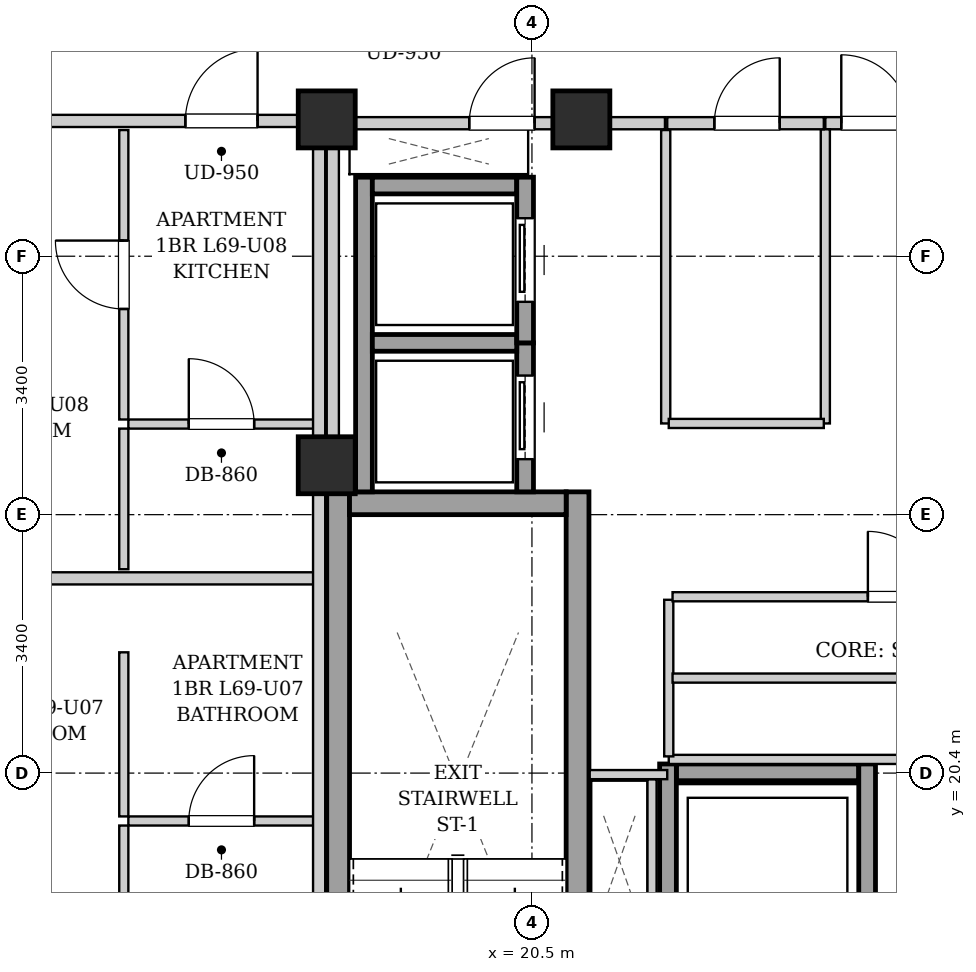
"""IFC4 building model, lengths in metres.
Left out: names, types, materials, properties, quantities, classifications, styles, units other than length and angle.
Written with IfcOpenShell. Run it as: python <this file> out.ifc"""

import sys

from ifc_helpers import new_model, si_unit, direction, frame, frame_2d, origin, origin_2d, place, context, subcontext, project, spatial, rectangle, extrude, element, fill, save


model = new_model("IFC4")
c1 = context("Model", 3, precision=1e-05, world=origin(), true_north=direction((0.0, 1.0)))
c2 = subcontext(c1, "Body", "Model", "MODEL_VIEW")
j1 = project(units=[si_unit("LENGTHUNIT", "METRE"), si_unit("PLANEANGLEUNIT", "RADIAN")], contexts=[c1])
p1 = place(None, origin())
s1 = spatial("IfcSite", under=j1, at=p1, CompositionType="ELEMENT")
p2 = place(p1, origin())
s2 = spatial("IfcBuilding", under=s1, at=p2, CompositionType="ELEMENT")
p3 = place(p2, frame((0.0, 0.0, 237.7)))
s3 = spatial("IfcBuildingStorey", under=s2, at=p3, CompositionType="ELEMENT", Elevation=237.7)
for number, where, z_axis, x_axis in (
    (1, (17.8, 29.0, 0.0), (0.0, 0.0, 1.0), (1.0, 0.0, 0.0)),
    (2, (21.15, 29.0, 0.0), (0.0, 0.0, 1.0), (1.0, 0.0, 0.0)),
    (3, (17.8, 24.45, 0.0), (0.0, 0.0, 1.0), (1.0, 0.0, 0.0)),
):
    element("IfcColumn", number, at=place(p3, frame(where, z_axis=z_axis, x_axis=x_axis)), inside=s3, PredefinedType="COLUMN", context=c2, shape_type="SweptSolid", body=[
        extrude(rectangle(XDim=0.75, YDim=0.75, at=origin_2d()), origin(), (0.0, 0.0, 1.0), 3.4),
    ])
for number, where, z_axis, x_axis in (
    (4, (17.95, 15.1, 0.0), (0.0, 0.0, 1.0), (0.0, 1.0, 0.0)),
    (5, (21.1, 15.1, 0.0), (0.0, 0.0, 1.0), (0.0, 1.0, 0.0)),
):
    element("IfcWall", number, at=place(p3, frame(where, z_axis=z_axis, x_axis=x_axis)), inside=s3, PredefinedType="SHEAR", context=c2, shape_type="SweptSolid", body=[
        extrude(rectangle(XDim=9.0, YDim=0.3, at=frame_2d((4.5, 0.0))), origin(), (0.0, 0.0, 1.0), 3.14),
    ])
p4 = place(p3, frame((18.1, 23.95, 0.0), z_axis=(0.0, 0.0, 1.0), x_axis=(1.0, 0.0, 0.0)))
e6 = element("IfcWall", 6, at=p4, inside=s3, PredefinedType="SHEAR", context=c2, shape_type="SweptSolid", body=[
    extrude(rectangle(XDim=2.85, YDim=0.3, at=frame_2d((1.425, 0.0))), origin(), (0.0, 0.0, 1.0), 3.14),
])
p5 = place(p3, frame((18.29, 24.1, 0.0), z_axis=(0.0, 0.0, 1.0), x_axis=(0.0, 1.0, 0.0)))
e7 = element("IfcWall", 7, at=p5, inside=s3, PredefinedType="SHEAR", context=c2, shape_type="SweptSolid", body=[
    extrude(rectangle(XDim=4.14, YDim=0.22, at=frame_2d((2.07, 0.0))), origin(), (0.0, 0.0, 1.0), 3.14),
])
p6 = place(p3, frame((20.41, 24.1, 0.0), z_axis=(0.0, 0.0, 1.0), x_axis=(0.0, 1.0, 0.0)))
e8 = element("IfcWall", 8, at=p6, inside=s3, PredefinedType="SHEAR", context=c2, shape_type="SweptSolid", body=[
    extrude(rectangle(XDim=1.96, YDim=0.22, at=frame_2d((0.98, 0.0))), origin(), (0.0, 0.0, 1.0), 3.14),
])
p7 = place(p6, frame((0.43, 0.0, 0.0)))
e9 = element("IfcOpeningElement", 9, at=p7, cuts=e8, PredefinedType="OPENING", context=c2, shape_type="SweptSolid", body=[
    extrude(rectangle(XDim=1.1, YDim=2.15, at=frame_2d((0.55, 1.075))), frame((0.0, 0.12, 0.0), z_axis=(0.0, -1.0, 0.0), x_axis=(1.0, 0.0, 0.0)), (0.0, 0.0, 1.0), 0.24),
])
for number, where, z_axis, x_axis in (
    (10, (18.4, 26.06, 0.0), (0.0, 0.0, 1.0), (1.0, 0.0, 0.0)),
    (11, (18.4, 28.13, 0.0), (0.0, 0.0, 1.0), (1.0, 0.0, 0.0)),
):
    element("IfcWall", number, at=place(p3, frame(where, z_axis=z_axis, x_axis=x_axis)), inside=s3, PredefinedType="SHEAR", context=c2, shape_type="SweptSolid", body=[
        extrude(rectangle(XDim=1.9, YDim=0.22, at=frame_2d((0.95, 0.0))), origin(), (0.0, 0.0, 1.0), 3.14),
    ])
p8 = place(p3, frame((20.41, 26.06, 0.0), z_axis=(0.0, 0.0, 1.0), x_axis=(0.0, 1.0, 0.0)))
e12 = element("IfcWall", 12, at=p8, inside=s3, PredefinedType="SHEAR", context=c2, shape_type="SweptSolid", body=[
    extrude(rectangle(XDim=2.18, YDim=0.22, at=frame_2d((1.09, 0.0))), origin(), (0.0, 0.0, 1.0), 3.14),
])
p9 = place(p8, frame((0.54, 0.0, 0.0)))
e13 = element("IfcOpeningElement", 13, at=p9, cuts=e12, PredefinedType="OPENING", context=c2, shape_type="SweptSolid", body=[
    extrude(rectangle(XDim=1.1, YDim=2.15, at=frame_2d((0.55, 1.075))), frame((0.0, 0.12, 0.0), z_axis=(0.0, -1.0, 0.0), x_axis=(1.0, 0.0, 0.0)), (0.0, 0.0, 1.0), 0.24),
])
p10 = place(p3, frame((22.4, 20.41, 0.0), z_axis=(0.0, 0.0, 1.0), x_axis=(1.0, 0.0, 0.0)))
e14 = element("IfcWall", 14, at=p10, inside=s3, PredefinedType="SHEAR", context=c2, shape_type="SweptSolid", body=[
    extrude(rectangle(XDim=2.4, YDim=0.22, at=frame_2d((1.2, 0.0))), origin(), (0.0, 0.0, 1.0), 3.14),
])
for number, where, z_axis, x_axis in (
    (15, (22.29, 17.98, 0.0), (0.0, 0.0, 1.0), (0.0, 1.0, 0.0)),
    (16, (24.91, 17.98, 0.0), (0.0, 0.0, 1.0), (0.0, 1.0, 0.0)),
):
    element("IfcWall", number, at=place(p3, frame(where, z_axis=z_axis, x_axis=x_axis)), inside=s3, PredefinedType="SHEAR", context=c2, shape_type="SweptSolid", body=[
        extrude(rectangle(XDim=2.54, YDim=0.22, at=frame_2d((1.27, 0.0))), origin(), (0.0, 0.0, 1.0), 3.14),
    ])
p11 = place(p3, frame((17.88, 24.12, 0.0), z_axis=(0.0, 0.0, 1.0), x_axis=(0.0, 1.0, 0.0)))
e17 = element("IfcWall", 17, at=p11, inside=s3, PredefinedType="PARTITIONING", context=c2, shape_type="SweptSolid", body=[
    extrude(rectangle(XDim=4.76, YDim=0.16, at=frame_2d((2.38, 0.0))), origin(), (0.0, 0.0, 1.0), 2.475),
])
p12 = place(p3, frame((24.36, 28.95, 0.0), z_axis=(0.0, 0.0, 1.0), x_axis=(1.0, 0.0, 0.0)))
e18 = element("IfcWall", 18, at=p12, inside=s3, PredefinedType="PARTITIONING", context=c2, shape_type="SweptSolid", body=[
    extrude(rectangle(XDim=1.32, YDim=0.16, at=frame_2d((0.66, 0.0))), origin(), (0.0, 0.0, 1.0), 2.668),
])
p13 = place(p12, frame((0.21, 0.0, 0.0)))
e19 = element("IfcOpeningElement", 19, at=p13, cuts=e18, PredefinedType="OPENING", context=c2, shape_type="SweptSolid", body=[
    extrude(rectangle(XDim=0.9, YDim=2.05, at=frame_2d((0.45, 1.025))), frame((0.0, 0.09, 0.0), z_axis=(0.0, -1.0, 0.0), x_axis=(1.0, 0.0, 0.0)), (0.0, 0.0, 1.0), 0.18),
])
p14 = place(p3, frame((17.96, 28.95, 0.0), z_axis=(0.0, 0.0, 1.0), x_axis=(1.0, 0.0, 0.0)))
e20 = element("IfcWall", 20, at=p14, inside=s3, PredefinedType="PARTITIONING", context=c2, shape_type="SweptSolid", body=[
    extrude(rectangle(XDim=4.29, YDim=0.16, at=frame_2d((2.145, 0.0))), origin(), (0.0, 0.0, 1.0), 2.668),
])
p15 = place(p14, frame((1.715, 0.0, 0.0)))
e21 = element("IfcOpeningElement", 21, at=p15, cuts=e20, PredefinedType="OPENING", context=c2, shape_type="SweptSolid", body=[
    extrude(rectangle(XDim=0.86, YDim=2.05, at=frame_2d((0.43, 1.025))), frame((0.0, 0.09, 0.0), z_axis=(0.0, -1.0, 0.0), x_axis=(1.0, 0.0, 0.0)), (0.0, 0.0, 1.0), 0.18),
])
p16 = place(p3, frame((22.08, 18.2, 0.0), z_axis=(0.0, 0.0, 1.0), x_axis=(0.0, 1.0, 0.0)))
e22 = element("IfcWall", 22, at=p16, inside=s3, PredefinedType="PARTITIONING", context=c2, shape_type="SweptSolid", body=[
    extrude(rectangle(XDim=2.12, YDim=0.12, at=frame_2d((1.06, 0.0))), origin(), (0.0, 0.0, 1.0), 3.14),
])
p17 = place(p3, frame((22.28, 20.38, 0.0), z_axis=(0.0, 0.0, 1.0), x_axis=(-1.0, 0.0, 0.0)))
e23 = element("IfcWall", 23, at=p17, inside=s3, PredefinedType="PARTITIONING", context=c2, shape_type="SweptSolid", body=[
    extrude(rectangle(XDim=1.02, YDim=0.12, at=frame_2d((0.51, 0.0))), origin(), (0.0, 0.0, 1.0), 3.14),
])
p18 = place(p3, frame((24.36, 25.0, 0.0), z_axis=(0.0, 0.0, 1.0), x_axis=(0.0, 1.0, 0.0)))
e24 = element("IfcWall", 24, at=p18, inside=s3, PredefinedType="PARTITIONING", context=c2, shape_type="SweptSolid", body=[
    extrude(rectangle(XDim=3.87, YDim=0.12, at=frame_2d((1.935, 0.0))), origin(), (0.0, 0.0, 1.0), 3.14),
])
p19 = place(p3, frame((22.26, 25.0, 0.0), z_axis=(0.0, 0.0, 1.0), x_axis=(0.0, 1.0, 0.0)))
e25 = element("IfcWall", 25, at=p19, inside=s3, PredefinedType="PARTITIONING", context=c2, shape_type="SweptSolid", body=[
    extrude(rectangle(XDim=3.86, YDim=0.12, at=frame_2d((1.93, 0.0))), origin(), (0.0, 0.0, 1.0), 3.14),
])
p20 = place(p3, frame((22.3, 25.0, 0.0), z_axis=(0.0, 0.0, 1.0), x_axis=(1.0, 0.0, 0.0)))
e26 = element("IfcWall", 26, at=p20, inside=s3, PredefinedType="PARTITIONING", context=c2, shape_type="SweptSolid", body=[
    extrude(rectangle(XDim=2.04, YDim=0.12, at=frame_2d((1.02, 0.0))), origin(), (0.0, 0.0, 1.0), 3.14),
])
p21 = place(p3, frame((22.28, 28.95, 0.0), z_axis=(0.0, 0.0, 1.0), x_axis=(1.0, 0.0, 0.0)))
e27 = element("IfcWall", 27, at=p21, inside=s3, PredefinedType="PARTITIONING", context=c2, shape_type="SweptSolid", body=[
    extrude(rectangle(XDim=2.06, YDim=0.16, at=frame_2d((1.03, 0.0))), origin(), (0.0, 0.0, 1.0), 2.668),
])
p22 = place(p21, frame((0.62, 0.0, 0.0)))
e28 = element("IfcOpeningElement", 28, at=p22, cuts=e27, PredefinedType="OPENING", context=c2, shape_type="SweptSolid", body=[
    extrude(rectangle(XDim=0.86, YDim=2.05, at=frame_2d((0.43, 1.025))), frame((0.0, 0.09, 0.0), z_axis=(0.0, -1.0, 0.0), x_axis=(1.0, 0.0, 0.0)), (0.0, 0.0, 1.0), 0.18),
])
p23 = place(p3, frame((22.3, 20.58, 0.0), z_axis=(0.0, 0.0, 1.0), x_axis=(1.0, 0.0, 0.0)))
e29 = element("IfcWall", 29, at=p23, inside=s3, PredefinedType="PARTITIONING", context=c2, shape_type="SweptSolid", body=[
    extrude(rectangle(XDim=7.35, YDim=0.12, at=frame_2d((3.675, 0.0))), origin(), (0.0, 0.0, 1.0), 3.14),
])
p24 = place(p3, frame((22.3, 20.62, 0.0), z_axis=(0.0, 0.0, 1.0), x_axis=(0.0, 1.0, 0.0)))
e30 = element("IfcWall", 30, at=p24, inside=s3, PredefinedType="PARTITIONING", context=c2, shape_type="SweptSolid", body=[
    extrude(rectangle(XDim=2.06, YDim=0.12, at=frame_2d((1.03, 0.0))), origin(), (0.0, 0.0, 1.0), 3.14),
])
p25 = place(p3, frame((22.35, 21.65, 0.0), z_axis=(0.0, 0.0, 1.0), x_axis=(1.0, 0.0, 0.0)))
e31 = element("IfcWall", 31, at=p25, inside=s3, PredefinedType="PARTITIONING", context=c2, shape_type="SweptSolid", body=[
    extrude(rectangle(XDim=5.79, YDim=0.12, at=frame_2d((2.895, 0.0))), origin(), (0.0, 0.0, 1.0), 3.14),
])
p26 = place(p3, frame((22.35, 22.72, 0.0), z_axis=(0.0, 0.0, 1.0), x_axis=(1.0, 0.0, 0.0)))
e32 = element("IfcWall", 32, at=p26, inside=s3, PredefinedType="PARTITIONING", context=c2, shape_type="SweptSolid", body=[
    extrude(rectangle(XDim=7.27, YDim=0.12, at=frame_2d((3.635, 0.0))), origin(), (0.0, 0.0, 1.0), 3.14),
])
p27 = place(p26, frame((2.57, 0.0, 0.0)))
e33 = element("IfcOpeningElement", 33, at=p27, cuts=e32, PredefinedType="OPENING", context=c2, shape_type="SweptSolid", body=[
    extrude(rectangle(XDim=0.86, YDim=2.05, at=frame_2d((0.43, 1.025))), frame((0.0, 0.07, 0.0), z_axis=(0.0, -1.0, 0.0), x_axis=(1.0, 0.0, 0.0)), (0.0, 0.0, 1.0), 0.14),
])
p28 = place(p26, frame((6.06, 0.0, 0.0)))
e34 = element("IfcOpeningElement", 34, at=p28, cuts=e32, PredefinedType="OPENING", context=c2, shape_type="SweptSolid", body=[
    extrude(rectangle(XDim=0.86, YDim=2.05, at=frame_2d((0.43, 1.025))), frame((0.0, 0.07, 0.0), z_axis=(0.0, -1.0, 0.0), x_axis=(1.0, 0.0, 0.0)), (0.0, 0.0, 1.0), 0.14),
])
p29 = place(p3, frame((10.88, 22.962, 0.0), z_axis=(0.0, 0.0, 1.0), x_axis=(1.0, 0.0, 0.0)))
e35 = element("IfcWall", 35, at=p29, inside=s3, PredefinedType="PARTITIONING", context=c2, shape_type="SweptSolid", body=[
    extrude(rectangle(XDim=6.76, YDim=0.16, at=frame_2d((3.38, 0.0))), origin(), (0.0, 0.0, 1.0), 3.14),
])
p30 = place(p3, frame((15.19, 19.77, 0.0), z_axis=(0.0, 0.0, 1.0), x_axis=(1.0, 0.0, 0.0)))
e36 = element("IfcWall", 36, at=p30, inside=s3, PredefinedType="PARTITIONING", context=c2, shape_type="SweptSolid", body=[
    extrude(rectangle(XDim=2.45, YDim=0.12, at=frame_2d((1.225, 0.0))), origin(), (0.0, 0.0, 1.0), 3.14),
])
p31 = place(p30, frame((0.795, 0.0, 0.0)))
e37 = element("IfcOpeningElement", 37, at=p31, cuts=e36, PredefinedType="OPENING", context=c2, shape_type="SweptSolid", body=[
    extrude(rectangle(XDim=0.86, YDim=2.05, at=frame_2d((0.43, 1.025))), frame((0.0, 0.07, 0.0), z_axis=(0.0, -1.0, 0.0), x_axis=(1.0, 0.0, 0.0)), (0.0, 0.0, 1.0), 0.14),
])
p32 = place(p3, frame((15.13, 19.83, 0.0), z_axis=(0.0, 0.0, 1.0), x_axis=(0.0, 1.0, 0.0)))
e38 = element("IfcWall", 38, at=p32, inside=s3, PredefinedType="PARTITIONING", context=c2, shape_type="SweptSolid", body=[
    extrude(rectangle(XDim=2.159, YDim=0.12, at=frame_2d((1.08, 0.0))), origin(), (0.0, 0.0, 1.0), 3.14),
])
p33 = place(p3, frame((15.13, 15.21, 0.0), z_axis=(0.0, 0.0, 1.0), x_axis=(0.0, 1.0, 0.0)))
e39 = element("IfcWall", 39, at=p33, inside=s3, PredefinedType="PARTITIONING", context=c2, shape_type="SweptSolid", body=[
    extrude(rectangle(XDim=4.5, YDim=0.12, at=frame_2d((2.25, 0.0))), origin(), (0.0, 0.0, 1.0), 3.14),
])
p34 = place(p33, frame((1.8, 0.0, 0.0)))
e40 = element("IfcOpeningElement", 40, at=p34, cuts=e39, PredefinedType="OPENING", context=c2, shape_type="SweptSolid", body=[
    extrude(rectangle(XDim=0.9, YDim=2.05, at=frame_2d((0.45, 1.025))), frame((0.0, 0.07, 0.0), z_axis=(0.0, -1.0, 0.0), x_axis=(1.0, 0.0, 0.0)), (0.0, 0.0, 1.0), 0.14),
])
p35 = place(p3, frame((10.88, 28.98, 0.0), z_axis=(0.0, 0.0, 1.0), x_axis=(1.0, 0.0, 0.0)))
e41 = element("IfcWall", 41, at=p35, inside=s3, PredefinedType="PARTITIONING", context=c2, shape_type="SweptSolid", body=[
    extrude(rectangle(XDim=6.88, YDim=0.16, at=frame_2d((3.44, 0.0))), origin(), (0.0, 0.0, 1.0), 2.668),
])
p36 = place(p35, frame((5.06, 0.0, 0.0)))
e42 = element("IfcOpeningElement", 42, at=p36, cuts=e41, PredefinedType="OPENING", context=c2, shape_type="SweptSolid", body=[
    extrude(rectangle(XDim=0.95, YDim=2.1, at=frame_2d((0.475, 1.05))), frame((0.0, 0.09, 0.0), z_axis=(0.0, -1.0, 0.0), x_axis=(1.0, 0.0, 0.0)), (0.0, 0.0, 1.0), 0.18),
])
p37 = place(p3, frame((15.19, 24.992, 0.0), z_axis=(0.0, 0.0, 1.0), x_axis=(1.0, 0.0, 0.0)))
e43 = element("IfcWall", 43, at=p37, inside=s3, PredefinedType="PARTITIONING", context=c2, shape_type="SweptSolid", body=[
    extrude(rectangle(XDim=2.45, YDim=0.12, at=frame_2d((1.225, 0.0))), origin(), (0.0, 0.0, 1.0), 3.14),
])
p38 = place(p37, frame((0.795, 0.0, 0.0)))
e44 = element("IfcOpeningElement", 44, at=p38, cuts=e43, PredefinedType="OPENING", context=c2, shape_type="SweptSolid", body=[
    extrude(rectangle(XDim=0.86, YDim=2.05, at=frame_2d((0.43, 1.025))), frame((0.0, 0.07, 0.0), z_axis=(0.0, -1.0, 0.0), x_axis=(1.0, 0.0, 0.0)), (0.0, 0.0, 1.0), 0.14),
])
p39 = place(p3, frame((15.13, 23.082, 0.0), z_axis=(0.0, 0.0, 1.0), x_axis=(0.0, 1.0, 0.0)))
e45 = element("IfcWall", 45, at=p39, inside=s3, PredefinedType="PARTITIONING", context=c2, shape_type="SweptSolid", body=[
    extrude(rectangle(XDim=1.85, YDim=0.12, at=frame_2d((0.925, 0.0))), origin(), (0.0, 0.0, 1.0), 3.14),
])
p40 = place(p3, frame((15.13, 25.052, 0.0), z_axis=(0.0, 0.0, 1.0), x_axis=(0.0, 1.0, 0.0)))
e46 = element("IfcWall", 46, at=p40, inside=s3, PredefinedType="PARTITIONING", context=c2, shape_type="SweptSolid", body=[
    extrude(rectangle(XDim=3.808, YDim=0.12, at=frame_2d((1.904, 0.0))), origin(), (0.0, 0.0, 1.0), 3.14),
])
p41 = place(p40, frame((1.454, 0.0, 0.0)))
e47 = element("IfcOpeningElement", 47, at=p41, cuts=e46, PredefinedType="OPENING", context=c2, shape_type="SweptSolid", body=[
    extrude(rectangle(XDim=0.9, YDim=2.05, at=frame_2d((0.45, 1.025))), frame((0.0, 0.07, 0.0), z_axis=(0.0, -1.0, 0.0), x_axis=(1.0, 0.0, 0.0)), (0.0, 0.0, 1.0), 0.14),
])
p42 = place(p3, frame((17.7, 15.02, 0.0), z_axis=(0.0, 0.0, 1.0), x_axis=(0.0, 1.0, 0.0)))
e48 = element("IfcWall", 48, at=p42, inside=s3, PredefinedType="PARTITIONING", context=c2, shape_type="SweptSolid", body=[
    extrude(rectangle(XDim=13.98, YDim=0.16, at=frame_2d((6.99, 0.0))), origin(), (0.0, 0.0, 1.0), 2.475),
])
p43 = place(p7, origin())
e49 = element("IfcDoor", 49, at=p43, inside=s3, OperationType="SLIDING_TO_LEFT", PredefinedType="DOOR", context=c2, shape_type="SweptSolid", body=[
    extrude(rectangle(XDim=1.1, YDim=2.15, at=frame_2d((0.55, 1.075))), frame((0.0, 0.025, 0.0), z_axis=(0.0, -1.0, 0.0), x_axis=(1.0, 0.0, 0.0)), (0.0, 0.0, 1.0), 0.05),
])
fill(e9, e49)
p44 = place(p9, origin())
e50 = element("IfcDoor", 50, at=p44, inside=s3, OperationType="SLIDING_TO_LEFT", PredefinedType="DOOR", context=c2, shape_type="SweptSolid", body=[
    extrude(rectangle(XDim=1.1, YDim=2.15, at=frame_2d((0.55, 1.075))), frame((0.0, 0.025, 0.0), z_axis=(0.0, -1.0, 0.0), x_axis=(1.0, 0.0, 0.0)), (0.0, 0.0, 1.0), 0.05),
])
fill(e13, e50)
p45 = place(p13, origin())
e51 = element("IfcDoor", 51, at=p45, inside=s3, OperationType="SINGLE_SWING_LEFT", PredefinedType="DOOR", context=c2, shape_type="SweptSolid", body=[
    extrude(rectangle(XDim=0.9, YDim=2.05, at=frame_2d((0.45, 1.025))), frame((0.0, 0.025, 0.0), z_axis=(0.0, -1.0, 0.0), x_axis=(1.0, 0.0, 0.0)), (0.0, 0.0, 1.0), 0.05),
])
fill(e19, e51)
p46 = place(p15, origin())
e52 = element("IfcDoor", 52, at=p46, inside=s3, OperationType="SINGLE_SWING_RIGHT", PredefinedType="DOOR", context=c2, shape_type="SweptSolid", body=[
    extrude(rectangle(XDim=0.86, YDim=2.05, at=frame_2d((0.43, 1.025))), frame((0.0, 0.025, 0.0), z_axis=(0.0, -1.0, 0.0), x_axis=(1.0, 0.0, 0.0)), (0.0, 0.0, 1.0), 0.05),
])
fill(e21, e52)
p47 = place(p22, origin())
e53 = element("IfcDoor", 53, at=p47, inside=s3, OperationType="SINGLE_SWING_RIGHT", PredefinedType="DOOR", context=c2, shape_type="SweptSolid", body=[
    extrude(rectangle(XDim=0.86, YDim=2.05, at=frame_2d((0.43, 1.025))), frame((0.0, 0.025, 0.0), z_axis=(0.0, -1.0, 0.0), x_axis=(1.0, 0.0, 0.0)), (0.0, 0.0, 1.0), 0.05),
])
fill(e28, e53)
p48 = place(p27, origin())
e54 = element("IfcDoor", 54, at=p48, inside=s3, OperationType="SINGLE_SWING_LEFT", PredefinedType="DOOR", context=c2, shape_type="SweptSolid", body=[
    extrude(rectangle(XDim=0.86, YDim=2.05, at=frame_2d((0.43, 1.025))), frame((0.0, 0.025, 0.0), z_axis=(0.0, -1.0, 0.0), x_axis=(1.0, 0.0, 0.0)), (0.0, 0.0, 1.0), 0.05),
])
fill(e33, e54)
p49 = place(p31, origin())
e55 = element("IfcDoor", 55, at=p49, inside=s3, OperationType="SINGLE_SWING_RIGHT", PredefinedType="DOOR", context=c2, shape_type="SweptSolid", body=[
    extrude(rectangle(XDim=0.86, YDim=2.05, at=frame_2d((0.43, 1.025))), frame((0.0, 0.025, 0.0), z_axis=(0.0, -1.0, 0.0), x_axis=(1.0, 0.0, 0.0)), (0.0, 0.0, 1.0), 0.05),
])
fill(e37, e55)
p50 = place(p36, origin())
e56 = element("IfcDoor", 56, at=p50, inside=s3, OperationType="SINGLE_SWING_RIGHT", PredefinedType="DOOR", context=c2, shape_type="SweptSolid", body=[
    extrude(rectangle(XDim=0.95, YDim=2.1, at=frame_2d((0.475, 1.05))), frame((0.0, 0.025, 0.0), z_axis=(0.0, -1.0, 0.0), x_axis=(1.0, 0.0, 0.0)), (0.0, 0.0, 1.0), 0.05),
])
fill(e42, e56)
p51 = place(p38, origin())
e57 = element("IfcDoor", 57, at=p51, inside=s3, OperationType="SINGLE_SWING_LEFT", PredefinedType="DOOR", context=c2, shape_type="SweptSolid", body=[
    extrude(rectangle(XDim=0.86, YDim=2.05, at=frame_2d((0.43, 1.025))), frame((0.0, 0.025, 0.0), z_axis=(0.0, -1.0, 0.0), x_axis=(1.0, 0.0, 0.0)), (0.0, 0.0, 1.0), 0.05),
])
fill(e44, e57)
p52 = place(p41, origin())
e58 = element("IfcDoor", 58, at=p52, inside=s3, OperationType="SINGLE_SWING_RIGHT", PredefinedType="DOOR", context=c2, shape_type="SweptSolid", body=[
    extrude(rectangle(XDim=0.9, YDim=2.05, at=frame_2d((0.45, 1.025))), frame((0.0, 0.025, 0.0), z_axis=(0.0, -1.0, 0.0), x_axis=(1.0, 0.0, 0.0)), (0.0, 0.0, 1.0), 0.05),
])
fill(e47, e58)
save(model, sys.argv[1])
